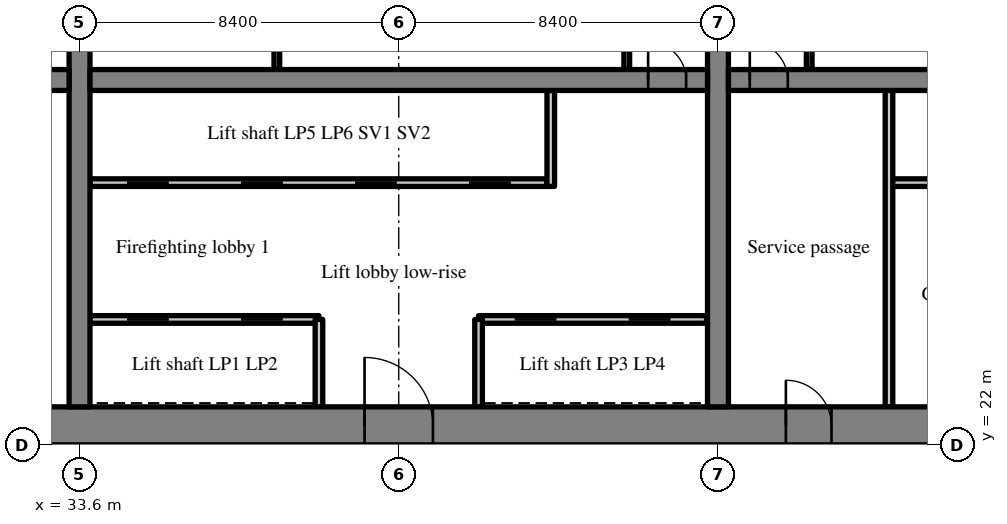
"""IFC4 building model, lengths in metres.
Left out: names, types, materials, properties, quantities, classifications, styles, units other than length and angle.
Written with IfcOpenShell. Run it as: python <this file> out.ifc"""

import sys

from ifc_helpers import new_model, si_unit, direction, frame, frame_2d, origin, place, context, subcontext, project, spatial, rectangle, extrude, source, transform, mapped, element, fill, save


model = new_model("IFC4")
c1 = context("Model", 3, precision=1e-05, world=origin(), true_north=direction((0.0, 1.0)))
c2 = subcontext(c1, "Body", "Model", "MODEL_VIEW")
j1 = project(units=[si_unit("LENGTHUNIT", "METRE"), si_unit("PLANEANGLEUNIT", "RADIAN")], contexts=[c1])
p1 = place(None, origin())
s1 = spatial("IfcSite", under=j1, at=p1, CompositionType="ELEMENT")
p2 = place(p1, origin())
s2 = spatial("IfcBuilding", under=s1, at=p2, CompositionType="ELEMENT")
p3 = place(p2, frame((0.0, 0.0, 65.8)))
s3 = spatial("IfcBuildingStorey", under=s2, at=p3, CompositionType="ELEMENT", Elevation=65.8)
m1 = source(origin(), c2, "Body", "SweptSolid", [
    extrude(rectangle(XDim=50.4, YDim=1.0, at=frame_2d((25.2, 0.0))), origin(), (0.0, 0.0, 1.0), 3.52),
])
p4 = place(p3, frame((25.2, 22.5, 0.0), z_axis=(0.0, 0.0, 1.0), x_axis=(1.0, 0.0, 0.0)))
e1 = element("IfcWall", 1, at=p4, inside=s3, PredefinedType="SHEAR", context=c2, shape_type="MappedRepresentation", body=[
    mapped(m1, transform((0.0, 0.0, 0.0), scale=1.0)),
])
m2 = source(origin(), c2, "Body", "SweptSolid", [
    extrude(rectangle(XDim=1.8, YDim=2.1, at=frame_2d((0.9, 1.05))), frame((0.0, 0.51, 0.0), z_axis=(0.0, -1.0, 0.0), x_axis=(1.0, 0.0, 0.0)), (0.0, 0.0, 1.0), 1.02),
])
p5 = place(p4, frame((15.9, 0.0, 0.0)))
e2 = element("IfcOpeningElement", 2, at=p5, cuts=e1, PredefinedType="OPENING", context=c2, shape_type="MappedRepresentation", body=[
    mapped(m2, transform((0.0, 0.0, 0.0), scale=1.0)),
])
m3 = source(origin(), c2, "Body", "SweptSolid", [
    extrude(rectangle(XDim=1.2, YDim=2.1, at=frame_2d((0.6, 1.05))), frame((0.0, 0.51, 0.0), z_axis=(0.0, -1.0, 0.0), x_axis=(1.0, 0.0, 0.0)), (0.0, 0.0, 1.0), 1.02),
])
p6 = place(p4, frame((26.987, 0.0, 0.0)))
e3 = element("IfcOpeningElement", 3, at=p6, cuts=e1, PredefinedType="OPENING", context=c2, shape_type="MappedRepresentation", body=[
    mapped(m3, transform((0.0, 0.0, 0.0), scale=1.0)),
])
m4 = source(origin(), c2, "Body", "SweptSolid", [
    extrude(rectangle(XDim=0.9, YDim=2.1, at=frame_2d((0.45, 1.05))), frame((0.0, 0.51, 0.0), z_axis=(0.0, -1.0, 0.0), x_axis=(1.0, 0.0, 0.0)), (0.0, 0.0, 1.0), 1.02),
])
p7 = place(p4, frame((34.5, 0.0, 0.0)))
e4 = element("IfcOpeningElement", 4, at=p7, cuts=e1, PredefinedType="OPENING", context=c2, shape_type="MappedRepresentation", body=[
    mapped(m4, transform((0.0, 0.0, 0.0), scale=1.0)),
])
p8 = place(p4, frame((31.5, 0.0, 0.0)))
e5 = element("IfcOpeningElement", 5, at=p8, cuts=e1, PredefinedType="OPENING", context=c2, shape_type="MappedRepresentation", body=[
    mapped(m4, transform((0.0, 0.0, 0.0), scale=1.0)),
])
p9 = place(p4, frame((39.769, 0.0, 0.0)))
e6 = element("IfcOpeningElement", 6, at=p9, cuts=e1, PredefinedType="OPENING", context=c2, shape_type="MappedRepresentation", body=[
    mapped(m4, transform((0.0, 0.0, 0.0), scale=1.0)),
])
p10 = place(p4, frame((36.756, 0.0, 0.0)))
e7 = element("IfcOpeningElement", 7, at=p10, cuts=e1, PredefinedType="OPENING", context=c2, shape_type="MappedRepresentation", body=[
    mapped(m4, transform((0.0, 0.0, 0.0), scale=1.0)),
])
p11 = place(p4, frame((6.438, 0.0, 0.0)))
e8 = element("IfcOpeningElement", 8, at=p11, cuts=e1, PredefinedType="OPENING", context=c2, shape_type="MappedRepresentation", body=[
    mapped(m3, transform((0.0, 0.0, 0.0), scale=1.0)),
])
p12 = place(p4, frame((47.725, 0.0, 0.0)))
e9 = element("IfcOpeningElement", 9, at=p12, cuts=e1, PredefinedType="OPENING", context=c2, shape_type="MappedRepresentation", body=[
    mapped(m3, transform((0.0, 0.0, 0.0), scale=1.0)),
])
m5 = source(origin(), c2, "Body", "SweptSolid", [
    extrude(rectangle(XDim=18.0, YDim=0.55, at=frame_2d((9.0, 0.0))), origin(), (0.0, 0.0, 1.0), 3.52),
])
p13 = place(p3, frame((33.6, 23.0, 0.0), z_axis=(0.0, 0.0, 1.0), x_axis=(0.0, 1.0, 0.0)))
e10 = element("IfcWall", 10, at=p13, inside=s3, PredefinedType="SHEAR", context=c2, shape_type="MappedRepresentation", body=[
    mapped(m5, transform((0.0, 0.0, 0.0), scale=1.0)),
])
m6 = source(origin(), c2, "Body", "SweptSolid", [
    extrude(rectangle(XDim=1.1, YDim=2.1, at=frame_2d((0.55, 1.05))), frame((0.0, 0.285, 0.0), z_axis=(0.0, -1.0, 0.0), x_axis=(1.0, 0.0, 0.0)), (0.0, 0.0, 1.0), 0.57),
])
p14 = place(p13, frame((12.45, 0.0, 0.0)))
e11 = element("IfcOpeningElement", 11, at=p14, cuts=e10, PredefinedType="OPENING", context=c2, shape_type="MappedRepresentation", body=[
    mapped(m6, transform((0.0, 0.0, 0.0), scale=1.0)),
])
p15 = place(p3, frame((50.4, 23.0, 0.0), z_axis=(0.0, 0.0, 1.0), x_axis=(0.0, 1.0, 0.0)))
e12 = element("IfcWall", 12, at=p15, inside=s3, PredefinedType="SHEAR", context=c2, shape_type="MappedRepresentation", body=[
    mapped(m5, transform((0.0, 0.0, 0.0), scale=1.0)),
])
p16 = place(p15, frame((12.45, 0.0, 0.0)))
e13 = element("IfcOpeningElement", 13, at=p16, cuts=e12, PredefinedType="OPENING", context=c2, shape_type="MappedRepresentation", body=[
    mapped(m6, transform((0.0, 0.0, 0.0), scale=1.0)),
])
m7 = source(origin(), c2, "Body", "SweptSolid", [
    extrude(rectangle(XDim=7.125, YDim=0.55, at=frame_2d((3.562, 0.0))), origin(), (0.0, 0.0, 1.0), 3.52),
])
p17 = place(p3, frame((26.2, 31.6, 0.0), z_axis=(0.0, 0.0, 1.0), x_axis=(1.0, 0.0, 0.0)))
e14 = element("IfcWall", 14, at=p17, inside=s3, PredefinedType="SHEAR", context=c2, shape_type="MappedRepresentation", body=[
    mapped(m7, transform((0.0, 0.0, 0.0), scale=1.0)),
])
p18 = place(p17, frame((5.488, 0.0, 0.0)))
e15 = element("IfcOpeningElement", 15, at=p18, cuts=e14, PredefinedType="OPENING", context=c2, shape_type="MappedRepresentation", body=[
    mapped(m6, transform((0.0, 0.0, 0.0), scale=1.0)),
])
m8 = source(origin(), c2, "Body", "SweptSolid", [
    extrude(rectangle(XDim=16.25, YDim=0.55, at=frame_2d((8.125, 0.0))), origin(), (0.0, 0.0, 1.0), 3.52),
])
p19 = place(p3, frame((33.875, 31.6, 0.0), z_axis=(0.0, 0.0, 1.0), x_axis=(1.0, 0.0, 0.0)))
e16 = element("IfcWall", 16, at=p19, inside=s3, PredefinedType="SHEAR", context=c2, shape_type="MappedRepresentation", body=[
    mapped(m8, transform((0.0, 0.0, 0.0), scale=1.0)),
])
m9 = source(origin(), c2, "Body", "SweptSolid", [
    extrude(rectangle(XDim=1.0, YDim=2.1, at=frame_2d((0.5, 1.05))), frame((0.0, 0.285, 0.0), z_axis=(0.0, -1.0, 0.0), x_axis=(1.0, 0.0, 0.0)), (0.0, 0.0, 1.0), 0.57),
])
p20 = place(p19, frame((14.687, 0.0, 0.0)))
e17 = element("IfcOpeningElement", 17, at=p20, cuts=e16, PredefinedType="OPENING", context=c2, shape_type="MappedRepresentation", body=[
    mapped(m9, transform((0.0, 0.0, 0.0), scale=1.0)),
])
p21 = place(p3, frame((50.675, 31.6, 0.0), z_axis=(0.0, 0.0, 1.0), x_axis=(1.0, 0.0, 0.0)))
e18 = element("IfcWall", 18, at=p21, inside=s3, PredefinedType="SHEAR", context=c2, shape_type="MappedRepresentation", body=[
    mapped(m8, transform((0.0, 0.0, 0.0), scale=1.0)),
])
p22 = place(p21, frame((0.562, 0.0, 0.0)))
e19 = element("IfcOpeningElement", 19, at=p22, cuts=e18, PredefinedType="OPENING", context=c2, shape_type="MappedRepresentation", body=[
    mapped(m9, transform((0.0, 0.0, 0.0), scale=1.0)),
])
m10 = source(origin(), c2, "Body", "SweptSolid", [
    extrude(rectangle(XDim=6.025, YDim=0.2, at=frame_2d((3.012, 0.0))), origin(), (0.0, 0.0, 1.0), 3.52),
])
p23 = place(p3, frame((33.875, 25.3, 0.0), z_axis=(0.0, 0.0, 1.0), x_axis=(1.0, 0.0, 0.0)))
e20 = element("IfcWall", 20, at=p23, inside=s3, PredefinedType="SOLIDWALL", context=c2, shape_type="MappedRepresentation", body=[
    mapped(m10, transform((0.0, 0.0, 0.0), scale=1.0)),
])
m11 = source(origin(), c2, "Body", "SweptSolid", [
    extrude(rectangle(XDim=1.1, YDim=2.1, at=frame_2d((0.55, 1.05))), frame((0.0, 0.11, 0.0), z_axis=(0.0, -1.0, 0.0), x_axis=(1.0, 0.0, 0.0)), (0.0, 0.0, 1.0), 0.22),
])
p24 = place(p23, frame((0.975, 0.0, 0.0)))
e21 = element("IfcOpeningElement", 21, at=p24, cuts=e20, PredefinedType="OPENING", context=c2, shape_type="MappedRepresentation", body=[
    mapped(m11, transform((0.0, 0.0, 0.0), scale=1.0)),
])
p25 = place(p23, frame((3.975, 0.0, 0.0)))
e22 = element("IfcOpeningElement", 22, at=p25, cuts=e20, PredefinedType="OPENING", context=c2, shape_type="MappedRepresentation", body=[
    mapped(m11, transform((0.0, 0.0, 0.0), scale=1.0)),
])
m12 = source(origin(), c2, "Body", "SweptSolid", [
    extrude(rectangle(XDim=6.0, YDim=0.2, at=frame_2d((3.0, 0.0))), origin(), (0.0, 0.0, 1.0), 3.52),
])
p26 = place(p3, frame((44.1, 25.3, 0.0), z_axis=(0.0, 0.0, 1.0), x_axis=(1.0, 0.0, 0.0)))
e23 = element("IfcWall", 23, at=p26, inside=s3, PredefinedType="SOLIDWALL", context=c2, shape_type="MappedRepresentation", body=[
    mapped(m12, transform((0.0, 0.0, 0.0), scale=1.0)),
])
p27 = place(p26, frame((0.95, 0.0, 0.0)))
e24 = element("IfcOpeningElement", 24, at=p27, cuts=e23, PredefinedType="OPENING", context=c2, shape_type="MappedRepresentation", body=[
    mapped(m11, transform((0.0, 0.0, 0.0), scale=1.0)),
])
p28 = place(p26, frame((3.95, 0.0, 0.0)))
e25 = element("IfcOpeningElement", 25, at=p28, cuts=e23, PredefinedType="OPENING", context=c2, shape_type="MappedRepresentation", body=[
    mapped(m11, transform((0.0, 0.0, 0.0), scale=1.0)),
])
m13 = source(origin(), c2, "Body", "SweptSolid", [
    extrude(rectangle(XDim=12.025, YDim=0.2, at=frame_2d((6.012, 0.0))), origin(), (0.0, 0.0, 1.0), 3.52),
])
p29 = place(p3, frame((33.875, 28.9, 0.0), z_axis=(0.0, 0.0, 1.0), x_axis=(1.0, 0.0, 0.0)))
e26 = element("IfcWall", 26, at=p29, inside=s3, PredefinedType="SOLIDWALL", context=c2, shape_type="MappedRepresentation", body=[
    mapped(m13, transform((0.0, 0.0, 0.0), scale=1.0)),
])
p30 = place(p29, frame((0.975, 0.0, 0.0)))
e27 = element("IfcOpeningElement", 27, at=p30, cuts=e26, PredefinedType="OPENING", context=c2, shape_type="MappedRepresentation", body=[
    mapped(m11, transform((0.0, 0.0, 0.0), scale=1.0)),
])
p31 = place(p29, frame((3.975, 0.0, 0.0)))
e28 = element("IfcOpeningElement", 28, at=p31, cuts=e26, PredefinedType="OPENING", context=c2, shape_type="MappedRepresentation", body=[
    mapped(m11, transform((0.0, 0.0, 0.0), scale=1.0)),
])
p32 = place(p29, frame((6.975, 0.0, 0.0)))
e29 = element("IfcOpeningElement", 29, at=p32, cuts=e26, PredefinedType="OPENING", context=c2, shape_type="MappedRepresentation", body=[
    mapped(m11, transform((0.0, 0.0, 0.0), scale=1.0)),
])
p33 = place(p29, frame((9.975, 0.0, 0.0)))
e30 = element("IfcOpeningElement", 30, at=p33, cuts=e26, PredefinedType="OPENING", context=c2, shape_type="MappedRepresentation", body=[
    mapped(m11, transform((0.0, 0.0, 0.0), scale=1.0)),
])
m14 = source(origin(), c2, "Body", "SweptSolid", [
    extrude(rectangle(XDim=2.3, YDim=0.2, at=frame_2d((1.15, 0.0))), origin(), (0.0, 0.0, 1.0), 3.52),
])
for number, where, z_axis, x_axis in (
    (31, (39.9, 23.0, 0.0), (0.0, 0.0, 1.0), (0.0, 1.0, 0.0)),
    (32, (44.1, 23.0, 0.0), (0.0, 0.0, 1.0), (0.0, 1.0, 0.0)),
):
    element("IfcWall", number, at=place(p3, frame(where, z_axis=z_axis, x_axis=x_axis)), inside=s3, PredefinedType="SOLIDWALL", context=c2, shape_type="MappedRepresentation", body=[
        mapped(m14, transform((0.0, 0.0, 0.0), scale=1.0)),
    ])
m15 = source(origin(), c2, "Body", "SweptSolid", [
    extrude(rectangle(XDim=2.525, YDim=0.2, at=frame_2d((1.262, 0.0))), origin(), (0.0, 0.0, 1.0), 3.52),
])
p34 = place(p3, frame((46.0, 28.8, 0.0), z_axis=(0.0, 0.0, 1.0), x_axis=(0.0, 1.0, 0.0)))
e33 = element("IfcWall", 33, at=p34, inside=s3, PredefinedType="SOLIDWALL", context=c2, shape_type="MappedRepresentation", body=[
    mapped(m15, transform((0.0, 0.0, 0.0), scale=1.0)),
])
m16 = source(origin(), c2, "Body", "SweptSolid", [
    extrude(rectangle(XDim=3.125, YDim=0.15, at=frame_2d((1.562, 0.0))), origin(), (0.0, 0.0, 1.0), 3.52),
])
for number, where, z_axis, x_axis in (
    (34, (48.0, 31.875, 0.0), (0.0, 0.0, 1.0), (0.0, 1.0, 0.0)),
    (35, (38.792, 31.875, 0.0), (0.0, 0.0, 1.0), (0.0, 1.0, 0.0)),
):
    element("IfcWall", number, at=place(p3, frame(where, z_axis=z_axis, x_axis=x_axis)), inside=s3, PredefinedType="PARTITIONING", context=c2, shape_type="MappedRepresentation", body=[
        mapped(m16, transform((0.0, 0.0, 0.0), scale=1.0)),
    ])
p35 = place(p3, frame((60.9, 28.9, 0.0), z_axis=(0.0, 0.0, 1.0), x_axis=(-1.0, 0.0, 0.0)))
e36 = element("IfcWall", 36, at=p35, inside=s3, PredefinedType="SOLIDWALL", context=c2, shape_type="MappedRepresentation", body=[
    mapped(m12, transform((0.0, 0.0, 0.0), scale=1.0)),
])
m17 = source(origin(), c2, "Body", "SweptSolid", [
    extrude(rectangle(XDim=8.325, YDim=0.2, at=frame_2d((4.163, 0.0))), origin(), (0.0, 0.0, 1.0), 3.52),
])
p36 = place(p3, frame((54.9, 23.0, 0.0), z_axis=(0.0, 0.0, 1.0), x_axis=(0.0, 1.0, 0.0)))
e37 = element("IfcWall", 37, at=p36, inside=s3, PredefinedType="PARTITIONING", context=c2, shape_type="MappedRepresentation", body=[
    mapped(m17, transform((0.0, 0.0, 0.0), scale=1.0)),
])
p37 = place(p3, frame((52.8, 31.875, 0.0), z_axis=(0.0, 0.0, 1.0), x_axis=(0.0, 1.0, 0.0)))
e38 = element("IfcWall", 38, at=p37, inside=s3, PredefinedType="PARTITIONING", context=c2, shape_type="MappedRepresentation", body=[
    mapped(m16, transform((0.0, 0.0, 0.0), scale=1.0)),
])
m18 = source(origin(), c2, "Body", "SweptSolid", [
    extrude(rectangle(XDim=1.8, YDim=2.1, at=frame_2d((0.9, 1.05))), frame((0.0, 0.375, 0.0), z_axis=(0.0, -1.0, 0.0), x_axis=(1.0, 0.0, 0.0)), (0.0, 0.0, 1.0), 0.05),
])
p38 = place(p5, origin())
e39 = element("IfcDoor", 39, at=p38, inside=s3, OperationType="DOUBLE_DOOR_SINGLE_SWING", PredefinedType="DOOR", context=c2, shape_type="MappedRepresentation", body=[
    mapped(m18, transform((0.0, 0.0, 0.0), scale=1.0)),
])
fill(e2, e39)
m19 = source(origin(), c2, "Body", "SweptSolid", [
    extrude(rectangle(XDim=1.0, YDim=2.1, at=frame_2d((0.5, 1.05))), frame((0.0, 0.025, 0.0), z_axis=(0.0, -1.0, 0.0), x_axis=(1.0, 0.0, 0.0)), (0.0, 0.0, 1.0), 0.05),
])
p39 = place(p20, origin())
e40 = element("IfcDoor", 40, at=p39, inside=s3, OperationType="SINGLE_SWING_LEFT", PredefinedType="DOOR", context=c2, shape_type="MappedRepresentation", body=[
    mapped(m19, transform((0.0, 0.0, 0.0), scale=1.0)),
])
fill(e17, e40)
m20 = source(origin(), c2, "Body", "SweptSolid", [
    extrude(rectangle(XDim=1.1, YDim=2.1, at=frame_2d((0.55, 1.05))), frame((0.0, 0.025, 0.0), z_axis=(0.0, -1.0, 0.0), x_axis=(1.0, 0.0, 0.0)), (0.0, 0.0, 1.0), 0.05),
])
p40 = place(p24, origin())
e41 = element("IfcDoor", 41, at=p40, inside=s3, OperationType="SLIDING_TO_LEFT", PredefinedType="DOOR", context=c2, shape_type="MappedRepresentation", body=[
    mapped(m20, transform((0.0, 0.0, 0.0), scale=1.0)),
])
fill(e21, e41)
p41 = place(p25, origin())
e42 = element("IfcDoor", 42, at=p41, inside=s3, OperationType="SLIDING_TO_RIGHT", PredefinedType="DOOR", context=c2, shape_type="MappedRepresentation", body=[
    mapped(m20, transform((0.0, 0.0, 0.0), scale=1.0)),
])
fill(e22, e42)
p42 = place(p27, origin())
e43 = element("IfcDoor", 43, at=p42, inside=s3, OperationType="SLIDING_TO_LEFT", PredefinedType="DOOR", context=c2, shape_type="MappedRepresentation", body=[
    mapped(m20, transform((0.0, 0.0, 0.0), scale=1.0)),
])
fill(e24, e43)
p43 = place(p28, origin())
e44 = element("IfcDoor", 44, at=p43, inside=s3, OperationType="SLIDING_TO_RIGHT", PredefinedType="DOOR", context=c2, shape_type="MappedRepresentation", body=[
    mapped(m20, transform((0.0, 0.0, 0.0), scale=1.0)),
])
fill(e25, e44)
p44 = place(p30, origin())
e45 = element("IfcDoor", 45, at=p44, inside=s3, OperationType="SLIDING_TO_LEFT", PredefinedType="DOOR", context=c2, shape_type="MappedRepresentation", body=[
    mapped(m20, transform((0.0, 0.0, 0.0), scale=1.0)),
])
fill(e27, e45)
p45 = place(p31, origin())
e46 = element("IfcDoor", 46, at=p45, inside=s3, OperationType="SLIDING_TO_RIGHT", PredefinedType="DOOR", context=c2, shape_type="MappedRepresentation", body=[
    mapped(m20, transform((0.0, 0.0, 0.0), scale=1.0)),
])
fill(e28, e46)
p46 = place(p32, origin())
e47 = element("IfcDoor", 47, at=p46, inside=s3, OperationType="SLIDING_TO_LEFT", PredefinedType="DOOR", context=c2, shape_type="MappedRepresentation", body=[
    mapped(m20, transform((0.0, 0.0, 0.0), scale=1.0)),
])
fill(e29, e47)
p47 = place(p33, origin())
e48 = element("IfcDoor", 48, at=p47, inside=s3, OperationType="SLIDING_TO_RIGHT", PredefinedType="DOOR", context=c2, shape_type="MappedRepresentation", body=[
    mapped(m20, transform((0.0, 0.0, 0.0), scale=1.0)),
])
fill(e30, e48)
m21 = source(origin(), c2, "Body", "SweptSolid", [
    extrude(rectangle(XDim=1.2, YDim=2.1, at=frame_2d((0.6, 1.05))), frame((0.0, 0.375, 0.0), z_axis=(0.0, -1.0, 0.0), x_axis=(1.0, 0.0, 0.0)), (0.0, 0.0, 1.0), 0.05),
])
p48 = place(p6, origin())
e49 = element("IfcDoor", 49, at=p48, inside=s3, OperationType="SINGLE_SWING_LEFT", PredefinedType="DOOR", context=c2, shape_type="MappedRepresentation", body=[
    mapped(m21, transform((0.0, 0.0, 0.0), scale=1.0)),
])
fill(e3, e49)
p49 = place(p22, origin())
e50 = element("IfcDoor", 50, at=p49, inside=s3, OperationType="SINGLE_SWING_LEFT", PredefinedType="DOOR", context=c2, shape_type="MappedRepresentation", body=[
    mapped(m19, transform((0.0, 0.0, 0.0), scale=1.0)),
])
fill(e19, e50)
save(model, sys.argv[1])
